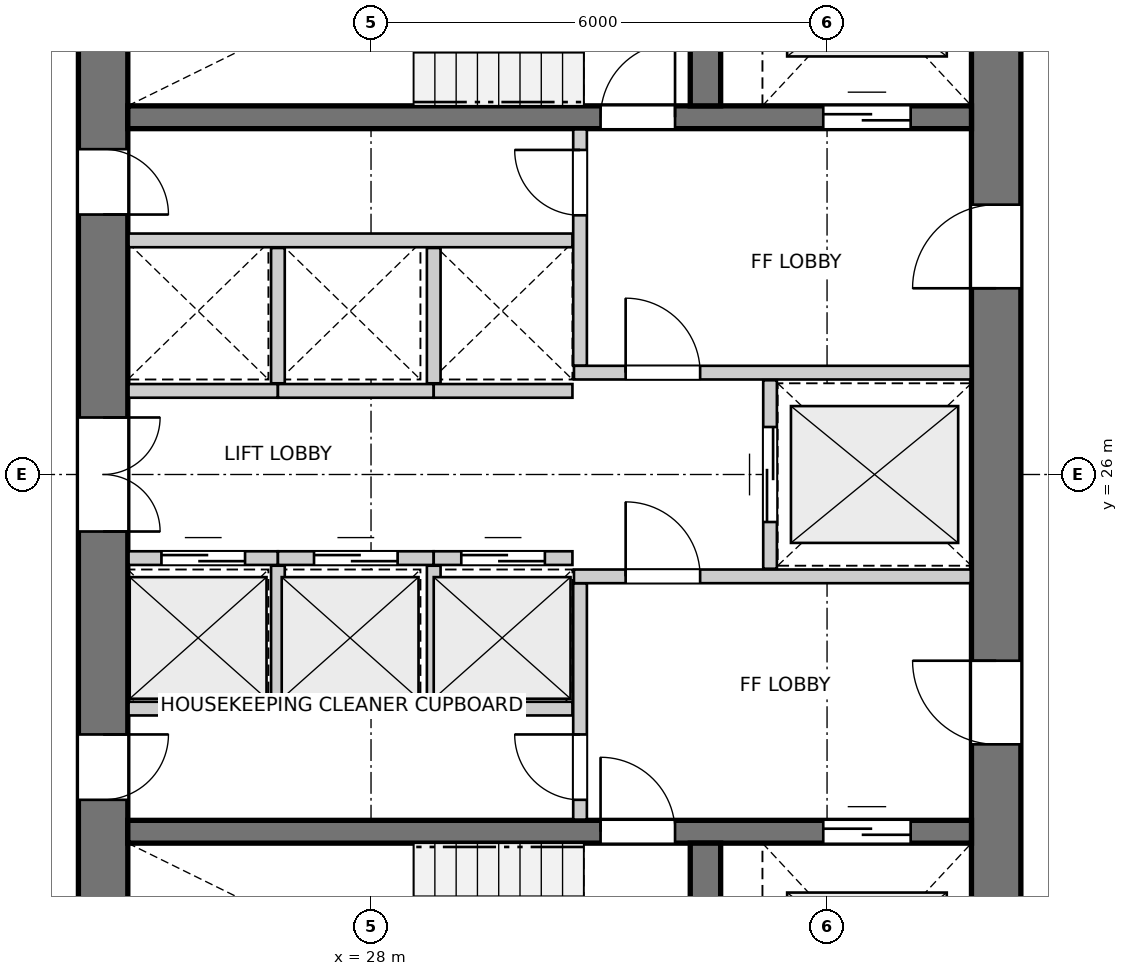
"""IFC4 building model, lengths in metres.
Left out: names, types, materials, properties, quantities, classifications, styles, units other than length and angle.
Written with IfcOpenShell. Run it as: python <this file> out.ifc"""

import sys

from ifc_helpers import new_model, si_unit, direction, frame, frame_2d, origin, place, context, subcontext, project, spatial, rectangle, extrude, source, transform, mapped, element, fill, save


model = new_model("IFC4")
c1 = context("Model", 3, precision=1e-05, world=origin(), true_north=direction((0.0, 1.0)))
c2 = subcontext(c1, "Body", "Model", "MODEL_VIEW")
j1 = project(units=[si_unit("LENGTHUNIT", "METRE"), si_unit("PLANEANGLEUNIT", "RADIAN")], contexts=[c1])
p1 = place(None, origin())
s1 = spatial("IfcSite", under=j1, at=p1, CompositionType="ELEMENT")
p2 = place(p1, origin())
s2 = spatial("IfcBuilding", under=s1, at=p2, CompositionType="ELEMENT")
p3 = place(p2, frame((0.0, 0.0, 73.6)))
s3 = spatial("IfcBuildingStorey", under=s2, at=p3, CompositionType="ELEMENT", Elevation=73.6)
p4 = place(p3, frame((24.475, 33.8, 0.0), z_axis=(0.0, 0.0, 1.0), x_axis=(0.0, -1.0, 0.0)))
e1 = element("IfcWall", 1, at=p4, inside=s3, PredefinedType="SHEAR", context=c2, shape_type="SweptSolid", body=[
    extrude(rectangle(XDim=15.6, YDim=0.65, at=frame_2d((7.8, 0.0))), origin(), (0.0, 0.0, 1.0), 2.95),
])
p5 = place(p4, frame((7.05, 0.0, 0.0)))
e2 = element("IfcOpeningElement", 2, at=p5, cuts=e1, PredefinedType="OPENING", context=c2, shape_type="SweptSolid", body=[
    extrude(rectangle(XDim=1.5, YDim=2.15, at=frame_2d((0.75, 1.075))), frame((0.0, 0.335, 0.0), z_axis=(0.0, -1.0, 0.0), x_axis=(1.0, 0.0, 0.0)), (0.0, 0.0, 1.0), 0.67),
])
p6 = place(p4, frame((3.52, 0.0, 0.0)))
e3 = element("IfcOpeningElement", 3, at=p6, cuts=e1, PredefinedType="OPENING", context=c2, shape_type="SweptSolid", body=[
    extrude(rectangle(XDim=0.86, YDim=2.05, at=frame_2d((0.43, 1.025))), frame((0.0, 0.335, 0.0), z_axis=(0.0, -1.0, 0.0), x_axis=(1.0, 0.0, 0.0)), (0.0, 0.0, 1.0), 0.67),
])
p7 = place(p4, frame((11.22, 0.0, 0.0)))
e4 = element("IfcOpeningElement", 4, at=p7, cuts=e1, PredefinedType="OPENING", context=c2, shape_type="SweptSolid", body=[
    extrude(rectangle(XDim=0.86, YDim=2.05, at=frame_2d((0.43, 1.025))), frame((0.0, 0.335, 0.0), z_axis=(0.0, -1.0, 0.0), x_axis=(1.0, 0.0, 0.0)), (0.0, 0.0, 1.0), 0.67),
])
p8 = place(p3, frame((36.225, 18.2, 0.0), z_axis=(0.0, 0.0, 1.0), x_axis=(0.0, 1.0, 0.0)))
e5 = element("IfcWall", 5, at=p8, inside=s3, PredefinedType="SHEAR", context=c2, shape_type="SweptSolid", body=[
    extrude(rectangle(XDim=15.6, YDim=0.65, at=frame_2d((7.8, 0.0))), origin(), (0.0, 0.0, 1.0), 2.95),
])
p9 = place(p8, frame((4.25, 0.0, 0.0)))
e6 = element("IfcOpeningElement", 6, at=p9, cuts=e5, PredefinedType="OPENING", context=c2, shape_type="SweptSolid", body=[
    extrude(rectangle(XDim=1.1, YDim=2.15, at=frame_2d((0.55, 1.075))), frame((0.0, 0.335, 0.0), z_axis=(0.0, -1.0, 0.0), x_axis=(1.0, 0.0, 0.0)), (0.0, 0.0, 1.0), 0.67),
])
p10 = place(p8, frame((10.25, 0.0, 0.0)))
e7 = element("IfcOpeningElement", 7, at=p10, cuts=e5, PredefinedType="OPENING", context=c2, shape_type="SweptSolid", body=[
    extrude(rectangle(XDim=1.1, YDim=2.15, at=frame_2d((0.55, 1.075))), frame((0.0, 0.335, 0.0), z_axis=(0.0, -1.0, 0.0), x_axis=(1.0, 0.0, 0.0)), (0.0, 0.0, 1.0), 0.67),
])
p11 = place(p3, frame((24.8, 21.3, 0.0), z_axis=(0.0, 0.0, 1.0), x_axis=(1.0, 0.0, 0.0)))
e8 = element("IfcWall", 8, at=p11, inside=s3, PredefinedType="SHEAR", context=c2, shape_type="SweptSolid", body=[
    extrude(rectangle(XDim=11.1, YDim=0.3, at=frame_2d((5.55, 0.0))), origin(), (0.0, 0.0, 1.0), 2.95),
])
p12 = place(p11, frame((6.22, 0.0, 0.0)))
e9 = element("IfcOpeningElement", 9, at=p12, cuts=e8, PredefinedType="OPENING", context=c2, shape_type="SweptSolid", body=[
    extrude(rectangle(XDim=0.98, YDim=2.15, at=frame_2d((0.49, 1.075))), frame((0.0, 0.16, 0.0), z_axis=(0.0, -1.0, 0.0), x_axis=(1.0, 0.0, 0.0)), (0.0, 0.0, 1.0), 0.32),
])
p13 = place(p11, frame((9.15, 0.0, 0.0)))
e10 = element("IfcOpeningElement", 10, at=p13, cuts=e8, PredefinedType="OPENING", context=c2, shape_type="SweptSolid", body=[
    extrude(rectangle(XDim=1.15, YDim=2.15, at=frame_2d((0.575, 1.075))), frame((0.0, 0.16, 0.0), z_axis=(0.0, -1.0, 0.0), x_axis=(1.0, 0.0, 0.0)), (0.0, 0.0, 1.0), 0.32),
])
p14 = place(p3, frame((32.4, 18.2, 0.0), z_axis=(0.0, 0.0, 1.0), x_axis=(0.0, 1.0, 0.0)))
e11 = element("IfcWall", 11, at=p14, inside=s3, PredefinedType="SHEAR", context=c2, shape_type="SweptSolid", body=[
    extrude(rectangle(XDim=2.95, YDim=0.4, at=frame_2d((1.475, 0.0))), origin(), (0.0, 0.0, 1.0), 2.95),
])
p15 = place(p3, frame((24.8, 30.7, 0.0), z_axis=(0.0, 0.0, 1.0), x_axis=(1.0, 0.0, 0.0)))
e12 = element("IfcWall", 12, at=p15, inside=s3, PredefinedType="SHEAR", context=c2, shape_type="SweptSolid", body=[
    extrude(rectangle(XDim=11.1, YDim=0.3, at=frame_2d((5.55, 0.0))), origin(), (0.0, 0.0, 1.0), 2.95),
])
p16 = place(p15, frame((6.22, 0.0, 0.0)))
e13 = element("IfcOpeningElement", 13, at=p16, cuts=e12, PredefinedType="OPENING", context=c2, shape_type="SweptSolid", body=[
    extrude(rectangle(XDim=0.98, YDim=2.15, at=frame_2d((0.49, 1.075))), frame((0.0, 0.16, 0.0), z_axis=(0.0, -1.0, 0.0), x_axis=(1.0, 0.0, 0.0)), (0.0, 0.0, 1.0), 0.32),
])
p17 = place(p15, frame((9.15, 0.0, 0.0)))
e14 = element("IfcOpeningElement", 14, at=p17, cuts=e12, PredefinedType="OPENING", context=c2, shape_type="SweptSolid", body=[
    extrude(rectangle(XDim=1.15, YDim=2.15, at=frame_2d((0.575, 1.075))), frame((0.0, 0.16, 0.0), z_axis=(0.0, -1.0, 0.0), x_axis=(1.0, 0.0, 0.0)), (0.0, 0.0, 1.0), 0.32),
])
p18 = place(p3, frame((32.4, 30.85, 0.0), z_axis=(0.0, 0.0, 1.0), x_axis=(0.0, 1.0, 0.0)))
e15 = element("IfcWall", 15, at=p18, inside=s3, PredefinedType="SHEAR", context=c2, shape_type="SweptSolid", body=[
    extrude(rectangle(XDim=2.95, YDim=0.4, at=frame_2d((1.475, 0.0))), origin(), (0.0, 0.0, 1.0), 2.95),
])
p19 = place(p3, frame((30.75, 21.46, 0.0), z_axis=(0.0, 0.0, 1.0), x_axis=(0.0, 1.0, 0.0)))
e16 = element("IfcWall", 16, at=p19, inside=s3, PredefinedType="PARTITIONING", context=c2, shape_type="SweptSolid", body=[
    extrude(rectangle(XDim=3.11, YDim=0.18, at=frame_2d((1.555, 0.0))), origin(), (0.0, 0.0, 1.0), 2.95),
])
p20 = place(p19, frame((0.26, 0.0, 0.0)))
e17 = element("IfcOpeningElement", 17, at=p20, cuts=e16, PredefinedType="OPENING", context=c2, shape_type="SweptSolid", body=[
    extrude(rectangle(XDim=0.86, YDim=2.05, at=frame_2d((0.43, 1.025))), frame((0.0, 0.1, 0.0), z_axis=(0.0, -1.0, 0.0), x_axis=(1.0, 0.0, 0.0)), (0.0, 0.0, 1.0), 0.2),
])
p21 = place(p3, frame((30.67, 24.66, 0.0), z_axis=(0.0, 0.0, 1.0), x_axis=(1.0, 0.0, 0.0)))
e18 = element("IfcWall", 18, at=p21, inside=s3, PredefinedType="PARTITIONING", context=c2, shape_type="SweptSolid", body=[
    extrude(rectangle(XDim=5.22, YDim=0.18, at=frame_2d((2.61, 0.0))), origin(), (0.0, 0.0, 1.0), 2.95),
])
p22 = place(p21, frame((0.68, 0.0, 0.0)))
e19 = element("IfcOpeningElement", 19, at=p22, cuts=e18, PredefinedType="OPENING", context=c2, shape_type="SweptSolid", body=[
    extrude(rectangle(XDim=0.98, YDim=2.15, at=frame_2d((0.49, 1.075))), frame((0.0, 0.1, 0.0), z_axis=(0.0, -1.0, 0.0), x_axis=(1.0, 0.0, 0.0)), (0.0, 0.0, 1.0), 0.2),
])
p23 = place(p3, frame((30.75, 27.43, 0.0), z_axis=(0.0, 0.0, 1.0), x_axis=(0.0, 1.0, 0.0)))
e20 = element("IfcWall", 20, at=p23, inside=s3, PredefinedType="PARTITIONING", context=c2, shape_type="SweptSolid", body=[
    extrude(rectangle(XDim=3.11, YDim=0.18, at=frame_2d((1.555, 0.0))), origin(), (0.0, 0.0, 1.0), 2.95),
])
p24 = place(p23, frame((1.98, 0.0, 0.0)))
e21 = element("IfcOpeningElement", 21, at=p24, cuts=e20, PredefinedType="OPENING", context=c2, shape_type="SweptSolid", body=[
    extrude(rectangle(XDim=0.86, YDim=2.05, at=frame_2d((0.43, 1.025))), frame((0.0, 0.1, 0.0), z_axis=(0.0, -1.0, 0.0), x_axis=(1.0, 0.0, 0.0)), (0.0, 0.0, 1.0), 0.2),
])
p25 = place(p3, frame((30.67, 27.34, 0.0), z_axis=(0.0, 0.0, 1.0), x_axis=(1.0, 0.0, 0.0)))
e22 = element("IfcWall", 22, at=p25, inside=s3, PredefinedType="PARTITIONING", context=c2, shape_type="SweptSolid", body=[
    extrude(rectangle(XDim=5.22, YDim=0.18, at=frame_2d((2.61, 0.0))), origin(), (0.0, 0.0, 1.0), 2.95),
])
p26 = place(p25, frame((0.68, 0.0, 0.0)))
e23 = element("IfcOpeningElement", 23, at=p26, cuts=e22, PredefinedType="OPENING", context=c2, shape_type="SweptSolid", body=[
    extrude(rectangle(XDim=0.98, YDim=2.15, at=frame_2d((0.49, 1.075))), frame((0.0, 0.1, 0.0), z_axis=(0.0, -1.0, 0.0), x_axis=(1.0, 0.0, 0.0)), (0.0, 0.0, 1.0), 0.2),
])
p27 = place(p3, frame((33.25, 24.76, 0.0), z_axis=(0.0, 0.0, 1.0), x_axis=(0.0, 1.0, 0.0)))
e24 = element("IfcWall", 24, at=p27, inside=s3, PredefinedType="PARTITIONING", context=c2, shape_type="SweptSolid", body=[
    extrude(rectangle(XDim=2.48, YDim=0.18, at=frame_2d((1.24, 0.0))), origin(), (0.0, 0.0, 1.0), 2.95),
])
p28 = place(p27, frame((0.615, 0.0, 0.0)))
e25 = element("IfcOpeningElement", 25, at=p28, cuts=e24, PredefinedType="OPENING", context=c2, shape_type="SweptSolid", body=[
    extrude(rectangle(XDim=1.25, YDim=2.15, at=frame_2d((0.625, 1.075))), frame((0.0, 0.1, 0.0), z_axis=(0.0, -1.0, 0.0), x_axis=(1.0, 0.0, 0.0)), (0.0, 0.0, 1.0), 0.2),
])
p29 = place(p3, frame((24.81, 22.92, 0.0), z_axis=(0.0, 0.0, 1.0), x_axis=(1.0, 0.0, 0.0)))
e26 = element("IfcWall", 26, at=p29, inside=s3, PredefinedType="PARTITIONING", context=c2, shape_type="SweptSolid", body=[
    extrude(rectangle(XDim=5.84, YDim=0.18, at=frame_2d((2.92, 0.0))), origin(), (0.0, 0.0, 1.0), 2.95),
])
p30 = place(p3, frame((24.81, 24.9, 0.0), z_axis=(0.0, 0.0, 1.0), x_axis=(1.0, 0.0, 0.0)))
e27 = element("IfcWall", 27, at=p30, inside=s3, PredefinedType="PARTITIONING", context=c2, shape_type="SweptSolid", body=[
    extrude(rectangle(XDim=1.965, YDim=0.18, at=frame_2d((0.982, 0.0))), origin(), (0.0, 0.0, 1.0), 2.95),
])
p31 = place(p30, frame((0.433, 0.0, 0.0)))
e28 = element("IfcOpeningElement", 28, at=p31, cuts=e27, PredefinedType="OPENING", context=c2, shape_type="SweptSolid", body=[
    extrude(rectangle(XDim=1.1, YDim=2.15, at=frame_2d((0.55, 1.075))), frame((0.0, 0.1, 0.0), z_axis=(0.0, -1.0, 0.0), x_axis=(1.0, 0.0, 0.0)), (0.0, 0.0, 1.0), 0.2),
])
p32 = place(p3, frame((26.775, 24.9, 0.0), z_axis=(0.0, 0.0, 1.0), x_axis=(1.0, 0.0, 0.0)))
e29 = element("IfcWall", 29, at=p32, inside=s3, PredefinedType="PARTITIONING", context=c2, shape_type="SweptSolid", body=[
    extrude(rectangle(XDim=2.05, YDim=0.18, at=frame_2d((1.025, 0.0))), origin(), (0.0, 0.0, 1.0), 2.95),
])
p33 = place(p32, frame((0.475, 0.0, 0.0)))
e30 = element("IfcOpeningElement", 30, at=p33, cuts=e29, PredefinedType="OPENING", context=c2, shape_type="SweptSolid", body=[
    extrude(rectangle(XDim=1.1, YDim=2.15, at=frame_2d((0.55, 1.075))), frame((0.0, 0.1, 0.0), z_axis=(0.0, -1.0, 0.0), x_axis=(1.0, 0.0, 0.0)), (0.0, 0.0, 1.0), 0.2),
])
p34 = place(p3, frame((26.775, 23.02, 0.0), z_axis=(0.0, 0.0, 1.0), x_axis=(0.0, 1.0, 0.0)))
e31 = element("IfcWall", 31, at=p34, inside=s3, PredefinedType="PARTITIONING", context=c2, shape_type="SweptSolid", body=[
    extrude(rectangle(XDim=1.78, YDim=0.18, at=frame_2d((0.89, 0.0))), origin(), (0.0, 0.0, 1.0), 2.95),
])
p35 = place(p3, frame((28.825, 24.9, 0.0), z_axis=(0.0, 0.0, 1.0), x_axis=(1.0, 0.0, 0.0)))
e32 = element("IfcWall", 32, at=p35, inside=s3, PredefinedType="PARTITIONING", context=c2, shape_type="SweptSolid", body=[
    extrude(rectangle(XDim=1.825, YDim=0.18, at=frame_2d((0.913, 0.0))), origin(), (0.0, 0.0, 1.0), 2.95),
])
p36 = place(p35, frame((0.363, 0.0, 0.0)))
e33 = element("IfcOpeningElement", 33, at=p36, cuts=e32, PredefinedType="OPENING", context=c2, shape_type="SweptSolid", body=[
    extrude(rectangle(XDim=1.1, YDim=2.15, at=frame_2d((0.55, 1.075))), frame((0.0, 0.1, 0.0), z_axis=(0.0, -1.0, 0.0), x_axis=(1.0, 0.0, 0.0)), (0.0, 0.0, 1.0), 0.2),
])
p37 = place(p3, frame((28.825, 23.02, 0.0), z_axis=(0.0, 0.0, 1.0), x_axis=(0.0, 1.0, 0.0)))
e34 = element("IfcWall", 34, at=p37, inside=s3, PredefinedType="PARTITIONING", context=c2, shape_type="SweptSolid", body=[
    extrude(rectangle(XDim=1.78, YDim=0.18, at=frame_2d((0.89, 0.0))), origin(), (0.0, 0.0, 1.0), 2.95),
])
p38 = place(p3, frame((24.81, 29.08, 0.0), z_axis=(0.0, 0.0, 1.0), x_axis=(1.0, 0.0, 0.0)))
e35 = element("IfcWall", 35, at=p38, inside=s3, PredefinedType="PARTITIONING", context=c2, shape_type="SweptSolid", body=[
    extrude(rectangle(XDim=5.84, YDim=0.18, at=frame_2d((2.92, 0.0))), origin(), (0.0, 0.0, 1.0), 2.95),
])
p39 = place(p3, frame((24.81, 27.1, 0.0), z_axis=(0.0, 0.0, 1.0), x_axis=(1.0, 0.0, 0.0)))
e36 = element("IfcWall", 36, at=p39, inside=s3, PredefinedType="PARTITIONING", context=c2, shape_type="SweptSolid", body=[
    extrude(rectangle(XDim=1.965, YDim=0.18, at=frame_2d((0.982, 0.0))), origin(), (0.0, 0.0, 1.0), 2.95),
])
p40 = place(p3, frame((26.775, 27.1, 0.0), z_axis=(0.0, 0.0, 1.0), x_axis=(1.0, 0.0, 0.0)))
e37 = element("IfcWall", 37, at=p40, inside=s3, PredefinedType="PARTITIONING", context=c2, shape_type="SweptSolid", body=[
    extrude(rectangle(XDim=2.05, YDim=0.18, at=frame_2d((1.025, 0.0))), origin(), (0.0, 0.0, 1.0), 2.95),
])
p41 = place(p3, frame((26.775, 27.2, 0.0), z_axis=(0.0, 0.0, 1.0), x_axis=(0.0, 1.0, 0.0)))
e38 = element("IfcWall", 38, at=p41, inside=s3, PredefinedType="PARTITIONING", context=c2, shape_type="SweptSolid", body=[
    extrude(rectangle(XDim=1.78, YDim=0.18, at=frame_2d((0.89, 0.0))), origin(), (0.0, 0.0, 1.0), 2.95),
])
p42 = place(p3, frame((28.825, 27.1, 0.0), z_axis=(0.0, 0.0, 1.0), x_axis=(1.0, 0.0, 0.0)))
e39 = element("IfcWall", 39, at=p42, inside=s3, PredefinedType="PARTITIONING", context=c2, shape_type="SweptSolid", body=[
    extrude(rectangle(XDim=1.825, YDim=0.18, at=frame_2d((0.913, 0.0))), origin(), (0.0, 0.0, 1.0), 2.95),
])
p43 = place(p3, frame((28.825, 27.2, 0.0), z_axis=(0.0, 0.0, 1.0), x_axis=(0.0, 1.0, 0.0)))
e40 = element("IfcWall", 40, at=p43, inside=s3, PredefinedType="PARTITIONING", context=c2, shape_type="SweptSolid", body=[
    extrude(rectangle(XDim=1.78, YDim=0.18, at=frame_2d((0.89, 0.0))), origin(), (0.0, 0.0, 1.0), 2.95),
])
m1 = source(origin(), c2, "Body", "SweptSolid", [
    extrude(rectangle(XDim=0.98, YDim=2.15, at=frame_2d((0.49, 1.075))), frame((0.0, 0.025, 0.0), z_axis=(0.0, -1.0, 0.0), x_axis=(1.0, 0.0, 0.0)), (0.0, 0.0, 1.0), 0.05),
])
p44 = place(p12, origin())
e41 = element("IfcDoor", 41, at=p44, inside=s3, OperationType="SINGLE_SWING_LEFT", PredefinedType="DOOR", context=c2, shape_type="MappedRepresentation", body=[
    mapped(m1, transform((0.0, 0.0, 0.0), x_axis=(1.0, 0.0, 0.0), y_axis=(0.0, 1.0, 0.0), z_axis=(0.0, 0.0, 1.0), scale=1.0)),
])
fill(e9, e41)
m2 = source(origin(), c2, "Body", "SweptSolid", [
    extrude(rectangle(XDim=1.15, YDim=2.15, at=frame_2d((0.575, 1.075))), frame((0.0, 0.025, 0.0), z_axis=(0.0, -1.0, 0.0), x_axis=(1.0, 0.0, 0.0)), (0.0, 0.0, 1.0), 0.05),
])
p45 = place(p13, origin())
e42 = element("IfcDoor", 42, at=p45, inside=s3, OperationType="DOUBLE_DOOR_SLIDING", PredefinedType="DOOR", context=c2, shape_type="MappedRepresentation", body=[
    mapped(m2, transform((0.0, 0.0, 0.0), x_axis=(1.0, 0.0, 0.0), y_axis=(0.0, 1.0, 0.0), z_axis=(0.0, 0.0, 1.0), scale=1.0)),
])
fill(e10, e42)
p46 = place(p16, origin())
e43 = element("IfcDoor", 43, at=p46, inside=s3, OperationType="SINGLE_SWING_RIGHT", PredefinedType="DOOR", context=c2, shape_type="MappedRepresentation", body=[
    mapped(m1, transform((0.0, 0.0, 0.0), x_axis=(1.0, 0.0, 0.0), y_axis=(0.0, 1.0, 0.0), z_axis=(0.0, 0.0, 1.0), scale=1.0)),
])
fill(e13, e43)
p47 = place(p17, origin())
e44 = element("IfcDoor", 44, at=p47, inside=s3, OperationType="DOUBLE_DOOR_SLIDING", PredefinedType="DOOR", context=c2, shape_type="MappedRepresentation", body=[
    mapped(m2, transform((0.0, 0.0, 0.0), x_axis=(1.0, 0.0, 0.0), y_axis=(0.0, 1.0, 0.0), z_axis=(0.0, 0.0, 1.0), scale=1.0)),
])
fill(e14, e44)
m3 = source(origin(), c2, "Body", "SweptSolid", [
    extrude(rectangle(XDim=1.1, YDim=2.15, at=frame_2d((0.55, 1.075))), frame((0.0, 0.025, 0.0), z_axis=(0.0, -1.0, 0.0), x_axis=(1.0, 0.0, 0.0)), (0.0, 0.0, 1.0), 0.05),
])
p48 = place(p9, origin())
e45 = element("IfcDoor", 45, at=p48, inside=s3, OperationType="SINGLE_SWING_RIGHT", PredefinedType="DOOR", context=c2, shape_type="MappedRepresentation", body=[
    mapped(m3, transform((0.0, 0.0, 0.0), x_axis=(1.0, 0.0, 0.0), y_axis=(0.0, 1.0, 0.0), z_axis=(0.0, 0.0, 1.0), scale=1.0)),
])
fill(e6, e45)
p49 = place(p10, origin())
e46 = element("IfcDoor", 46, at=p49, inside=s3, OperationType="SINGLE_SWING_LEFT", PredefinedType="DOOR", context=c2, shape_type="MappedRepresentation", body=[
    mapped(m3, transform((0.0, 0.0, 0.0), x_axis=(1.0, 0.0, 0.0), y_axis=(0.0, 1.0, 0.0), z_axis=(0.0, 0.0, 1.0), scale=1.0)),
])
fill(e7, e46)
m4 = source(origin(), c2, "Body", "SweptSolid", [
    extrude(rectangle(XDim=1.5, YDim=2.15, at=frame_2d((0.75, 1.075))), frame((0.0, 0.025, 0.0), z_axis=(0.0, -1.0, 0.0), x_axis=(1.0, 0.0, 0.0)), (0.0, 0.0, 1.0), 0.05),
])
p50 = place(p5, origin())
e47 = element("IfcDoor", 47, at=p50, inside=s3, OperationType="DOUBLE_DOOR_SINGLE_SWING", PredefinedType="DOOR", context=c2, shape_type="MappedRepresentation", body=[
    mapped(m4, transform((0.0, 0.0, 0.0), x_axis=(1.0, 0.0, 0.0), y_axis=(0.0, 1.0, 0.0), z_axis=(0.0, 0.0, 1.0), scale=1.0)),
])
fill(e2, e47)
m5 = source(origin(), c2, "Body", "SweptSolid", [
    extrude(rectangle(XDim=0.86, YDim=2.05, at=frame_2d((0.43, 1.025))), frame((0.0, 0.025, 0.0), z_axis=(0.0, -1.0, 0.0), x_axis=(1.0, 0.0, 0.0)), (0.0, 0.0, 1.0), 0.05),
])
p51 = place(p6, origin())
e48 = element("IfcDoor", 48, at=p51, inside=s3, OperationType="SINGLE_SWING_RIGHT", PredefinedType="DOOR", context=c2, shape_type="MappedRepresentation", body=[
    mapped(m5, transform((0.0, 0.0, 0.0), x_axis=(1.0, 0.0, 0.0), y_axis=(0.0, 1.0, 0.0), z_axis=(0.0, 0.0, 1.0), scale=1.0)),
])
fill(e3, e48)
p52 = place(p7, origin())
e49 = element("IfcDoor", 49, at=p52, inside=s3, OperationType="SINGLE_SWING_LEFT", PredefinedType="DOOR", context=c2, shape_type="MappedRepresentation", body=[
    mapped(m5, transform((0.0, 0.0, 0.0), x_axis=(1.0, 0.0, 0.0), y_axis=(0.0, 1.0, 0.0), z_axis=(0.0, 0.0, 1.0), scale=1.0)),
])
fill(e4, e49)
p53 = place(p20, origin())
e50 = element("IfcDoor", 50, at=p53, inside=s3, OperationType="SINGLE_SWING_RIGHT", PredefinedType="DOOR", context=c2, shape_type="MappedRepresentation", body=[
    mapped(m5, transform((0.0, 0.0, 0.0), x_axis=(1.0, 0.0, 0.0), y_axis=(0.0, 1.0, 0.0), z_axis=(0.0, 0.0, 1.0), scale=1.0)),
])
fill(e17, e50)
p54 = place(p22, origin())
e51 = element("IfcDoor", 51, at=p54, inside=s3, OperationType="SINGLE_SWING_LEFT", PredefinedType="DOOR", context=c2, shape_type="MappedRepresentation", body=[
    mapped(m1, transform((0.0, 0.0, 0.0), x_axis=(1.0, 0.0, 0.0), y_axis=(0.0, 1.0, 0.0), z_axis=(0.0, 0.0, 1.0), scale=1.0)),
])
fill(e19, e51)
p55 = place(p24, origin())
e52 = element("IfcDoor", 52, at=p55, inside=s3, OperationType="SINGLE_SWING_RIGHT", PredefinedType="DOOR", context=c2, shape_type="MappedRepresentation", body=[
    mapped(m5, transform((0.0, 0.0, 0.0), x_axis=(1.0, 0.0, 0.0), y_axis=(0.0, 1.0, 0.0), z_axis=(0.0, 0.0, 1.0), scale=1.0)),
])
fill(e21, e52)
p56 = place(p26, origin())
e53 = element("IfcDoor", 53, at=p56, inside=s3, OperationType="SINGLE_SWING_LEFT", PredefinedType="DOOR", context=c2, shape_type="MappedRepresentation", body=[
    mapped(m1, transform((0.0, 0.0, 0.0), x_axis=(1.0, 0.0, 0.0), y_axis=(0.0, 1.0, 0.0), z_axis=(0.0, 0.0, 1.0), scale=1.0)),
])
fill(e23, e53)
m6 = source(origin(), c2, "Body", "SweptSolid", [
    extrude(rectangle(XDim=1.25, YDim=2.15, at=frame_2d((0.625, 1.075))), frame((0.0, 0.025, 0.0), z_axis=(0.0, -1.0, 0.0), x_axis=(1.0, 0.0, 0.0)), (0.0, 0.0, 1.0), 0.05),
])
p57 = place(p28, origin())
e54 = element("IfcDoor", 54, at=p57, inside=s3, OperationType="DOUBLE_DOOR_SLIDING", PredefinedType="DOOR", context=c2, shape_type="MappedRepresentation", body=[
    mapped(m6, transform((0.0, 0.0, 0.0), x_axis=(1.0, 0.0, 0.0), y_axis=(0.0, 1.0, 0.0), z_axis=(0.0, 0.0, 1.0), scale=1.0)),
])
fill(e25, e54)
p58 = place(p31, origin())
e55 = element("IfcDoor", 55, at=p58, inside=s3, OperationType="DOUBLE_DOOR_SLIDING", PredefinedType="DOOR", context=c2, shape_type="MappedRepresentation", body=[
    mapped(m3, transform((0.0, 0.0, 0.0), x_axis=(1.0, 0.0, 0.0), y_axis=(0.0, 1.0, 0.0), z_axis=(0.0, 0.0, 1.0), scale=1.0)),
])
fill(e28, e55)
p59 = place(p33, origin())
e56 = element("IfcDoor", 56, at=p59, inside=s3, OperationType="DOUBLE_DOOR_SLIDING", PredefinedType="DOOR", context=c2, shape_type="MappedRepresentation", body=[
    mapped(m3, transform((0.0, 0.0, 0.0), x_axis=(1.0, 0.0, 0.0), y_axis=(0.0, 1.0, 0.0), z_axis=(0.0, 0.0, 1.0), scale=1.0)),
])
fill(e30, e56)
p60 = place(p36, origin())
e57 = element("IfcDoor", 57, at=p60, inside=s3, OperationType="DOUBLE_DOOR_SLIDING", PredefinedType="DOOR", context=c2, shape_type="MappedRepresentation", body=[
    mapped(m3, transform((0.0, 0.0, 0.0), x_axis=(1.0, 0.0, 0.0), y_axis=(0.0, 1.0, 0.0), z_axis=(0.0, 0.0, 1.0), scale=1.0)),
])
fill(e33, e57)
save(model, sys.argv[1])
